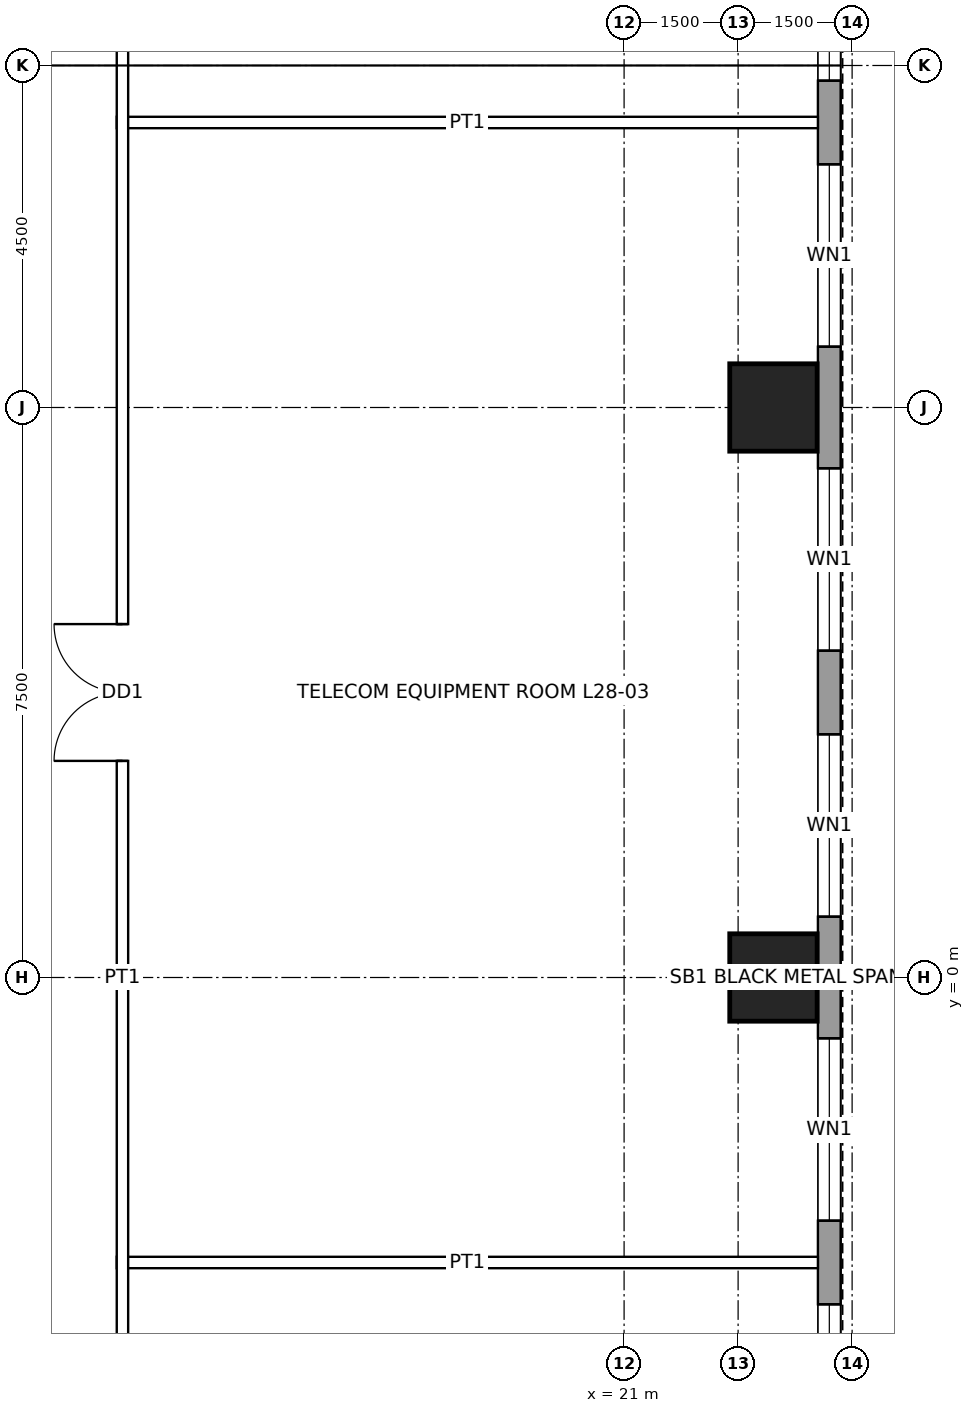
"""IFC4 building model, lengths in metres.
Left out: names, types, materials, properties, quantities, classifications, styles, units other than length and angle.
Written with IfcOpenShell. Run it as: python <this file> out.ifc"""

import sys

from ifc_helpers import new_model, si_unit, direction, frame, frame_2d, origin, origin_2d, place, context, subcontext, project, spatial, rectangle, hollow_rectangle, extrude, element, fill, save


model = new_model("IFC4")
c1 = context("Model", 3, precision=1e-05, world=origin(), true_north=direction((0.0, 1.0)))
c2 = subcontext(c1, "Body", "Model", "MODEL_VIEW")
j1 = project(units=[si_unit("LENGTHUNIT", "METRE"), si_unit("PLANEANGLEUNIT", "RADIAN")], contexts=[c1])
p1 = place(None, origin())
s1 = spatial("IfcSite", under=j1, at=p1, CompositionType="ELEMENT")
p2 = place(p1, origin())
s2 = spatial("IfcBuilding", under=s1, at=p2, CompositionType="ELEMENT")
p3 = place(p2, frame((0.0, 0.0, 140.4)))
s3 = spatial("IfcBuildingStorey", under=s2, at=p3, CompositionType="ELEMENT", Elevation=140.4)
for number, where, z_axis, x_axis in (
    (1, (22.965, 7.5, 0.0), (0.0, 0.0, 1.0), (1.0, 0.0, 0.0)),
    (2, (22.965, 0.0, 0.0), (0.0, 0.0, 1.0), (1.0, 0.0, 0.0)),
):
    element("IfcColumn", number, at=place(p3, frame(where, z_axis=z_axis, x_axis=x_axis)), inside=s3, PredefinedType="COLUMN", context=c2, shape_type="SweptSolid", body=[
        extrude(hollow_rectangle(XDim=1.15, YDim=1.15, WallThickness=0.075, at=origin_2d()), origin(), (0.0, 0.0, 1.0), 4.5),
    ])
p4 = place(p3, frame((23.7, 16.2, 0.0), z_axis=(0.0, 0.0, 1.0), x_axis=(0.0, -1.0, 0.0)))
e3 = element("IfcWall", 3, at=p4, inside=s3, PredefinedType="SOLIDWALL", context=c2, shape_type="SweptSolid", body=[
    extrude(rectangle(XDim=32.4, YDim=0.3, at=frame_2d((16.2, 0.0))), origin(), (0.0, 0.0, 1.0), 4.3),
])
p5 = place(p4, frame((2.0, 0.0, 1.0)))
e4 = element("IfcOpeningElement", 4, at=p5, cuts=e3, PredefinedType="OPENING", context=c2, shape_type="SweptSolid", body=[
    extrude(rectangle(XDim=2.4, YDim=1.2, at=frame_2d((1.2, 0.6))), frame((0.0, 0.16, 0.0), z_axis=(0.0, -1.0, 0.0), x_axis=(1.0, 0.0, 0.0)), (0.0, 0.0, 1.0), 0.32),
])
p6 = place(p4, frame((5.5, 0.0, 1.0)))
e5 = element("IfcOpeningElement", 5, at=p6, cuts=e3, PredefinedType="OPENING", context=c2, shape_type="SweptSolid", body=[
    extrude(rectangle(XDim=2.4, YDim=1.2, at=frame_2d((1.2, 0.6))), frame((0.0, 0.16, 0.0), z_axis=(0.0, -1.0, 0.0), x_axis=(1.0, 0.0, 0.0)), (0.0, 0.0, 1.0), 0.32),
])
p7 = place(p4, frame((9.5, 0.0, 1.0)))
e6 = element("IfcOpeningElement", 6, at=p7, cuts=e3, PredefinedType="OPENING", context=c2, shape_type="SweptSolid", body=[
    extrude(rectangle(XDim=2.4, YDim=1.2, at=frame_2d((1.2, 0.6))), frame((0.0, 0.16, 0.0), z_axis=(0.0, -1.0, 0.0), x_axis=(1.0, 0.0, 0.0)), (0.0, 0.0, 1.0), 0.32),
])
p8 = place(p4, frame((13.0, 0.0, 1.0)))
e7 = element("IfcOpeningElement", 7, at=p8, cuts=e3, PredefinedType="OPENING", context=c2, shape_type="SweptSolid", body=[
    extrude(rectangle(XDim=2.4, YDim=1.2, at=frame_2d((1.2, 0.6))), frame((0.0, 0.16, 0.0), z_axis=(0.0, -1.0, 0.0), x_axis=(1.0, 0.0, 0.0)), (0.0, 0.0, 1.0), 0.32),
])
p9 = place(p4, frame((17.0, 0.0, 1.0)))
e8 = element("IfcOpeningElement", 8, at=p9, cuts=e3, PredefinedType="OPENING", context=c2, shape_type="SweptSolid", body=[
    extrude(rectangle(XDim=2.4, YDim=1.2, at=frame_2d((1.2, 0.6))), frame((0.0, 0.16, 0.0), z_axis=(0.0, -1.0, 0.0), x_axis=(1.0, 0.0, 0.0)), (0.0, 0.0, 1.0), 0.32),
])
p10 = place(p4, frame((20.5, 0.0, 1.0)))
e9 = element("IfcOpeningElement", 9, at=p10, cuts=e3, PredefinedType="OPENING", context=c2, shape_type="SweptSolid", body=[
    extrude(rectangle(XDim=2.4, YDim=1.2, at=frame_2d((1.2, 0.6))), frame((0.0, 0.16, 0.0), z_axis=(0.0, -1.0, 0.0), x_axis=(1.0, 0.0, 0.0)), (0.0, 0.0, 1.0), 0.32),
])
p11 = place(p4, frame((24.5, 0.0, 1.0)))
e10 = element("IfcOpeningElement", 10, at=p11, cuts=e3, PredefinedType="OPENING", context=c2, shape_type="SweptSolid", body=[
    extrude(rectangle(XDim=2.4, YDim=1.2, at=frame_2d((1.2, 0.6))), frame((0.0, 0.16, 0.0), z_axis=(0.0, -1.0, 0.0), x_axis=(1.0, 0.0, 0.0)), (0.0, 0.0, 1.0), 0.32),
])
p12 = place(p4, frame((28.0, 0.0, 1.0)))
e11 = element("IfcOpeningElement", 11, at=p12, cuts=e3, PredefinedType="OPENING", context=c2, shape_type="SweptSolid", body=[
    extrude(rectangle(XDim=2.4, YDim=1.2, at=frame_2d((1.2, 0.6))), frame((0.0, 0.16, 0.0), z_axis=(0.0, -1.0, 0.0), x_axis=(1.0, 0.0, 0.0)), (0.0, 0.0, 1.0), 0.32),
])
for number, where, z_axis, x_axis in (
    (12, (14.325, -3.75, 0.0), (0.0, 0.0, 1.0), (1.0, 0.0, 0.0)),
    (13, (14.325, 11.25, 0.0), (0.0, 0.0, 1.0), (1.0, 0.0, 0.0)),
):
    element("IfcWall", number, at=place(p3, frame(where, z_axis=z_axis, x_axis=x_axis)), inside=s3, PredefinedType="PARTITIONING", context=c2, shape_type="SweptSolid", body=[
        extrude(rectangle(XDim=9.225, YDim=0.15, at=frame_2d((4.613, 0.0))), origin(), (0.0, 0.0, 1.0), 3.431),
    ])
p13 = place(p3, frame((14.4, -14.475, 0.0), z_axis=(0.0, 0.0, 1.0), x_axis=(0.0, 1.0, 0.0)))
e14 = element("IfcWall", 14, at=p13, inside=s3, PredefinedType="PARTITIONING", context=c2, shape_type="SweptSolid", body=[
    extrude(rectangle(XDim=28.95, YDim=0.15, at=frame_2d((14.475, 0.0))), origin(), (0.0, 0.0, 1.0), 4.3),
])
p14 = place(p13, frame((17.325, 0.0, 0.0)))
e15 = element("IfcOpeningElement", 15, at=p14, cuts=e14, PredefinedType="OPENING", context=c2, shape_type="SweptSolid", body=[
    extrude(rectangle(XDim=1.8, YDim=2.4, at=frame_2d((0.9, 1.2))), frame((0.0, 0.085, 0.0), z_axis=(0.0, -1.0, 0.0), x_axis=(1.0, 0.0, 0.0)), (0.0, 0.0, 1.0), 0.17),
])
p15 = place(p13, frame((6.075, 0.0, 0.0)))
e16 = element("IfcOpeningElement", 16, at=p15, cuts=e14, PredefinedType="OPENING", context=c2, shape_type="SweptSolid", body=[
    extrude(rectangle(XDim=1.8, YDim=2.4, at=frame_2d((0.9, 1.2))), frame((0.0, 0.085, 0.0), z_axis=(0.0, -1.0, 0.0), x_axis=(1.0, 0.0, 0.0)), (0.0, 0.0, 1.0), 0.17),
])
p16 = place(p5, origin())
e17 = element("IfcWindow", 17, at=p16, inside=s3, PartitioningType="SINGLE_PANEL", PredefinedType="WINDOW", context=c2, shape_type="SweptSolid", body=[
    extrude(rectangle(XDim=2.4, YDim=1.2, at=frame_2d((1.2, 0.6))), frame((0.0, 0.03, 0.0), z_axis=(0.0, -1.0, 0.0), x_axis=(1.0, 0.0, 0.0)), (0.0, 0.0, 1.0), 0.06),
])
fill(e4, e17)
p17 = place(p6, origin())
e18 = element("IfcWindow", 18, at=p17, inside=s3, PartitioningType="SINGLE_PANEL", PredefinedType="WINDOW", context=c2, shape_type="SweptSolid", body=[
    extrude(rectangle(XDim=2.4, YDim=1.2, at=frame_2d((1.2, 0.6))), frame((0.0, 0.03, 0.0), z_axis=(0.0, -1.0, 0.0), x_axis=(1.0, 0.0, 0.0)), (0.0, 0.0, 1.0), 0.06),
])
fill(e5, e18)
p18 = place(p7, origin())
e19 = element("IfcWindow", 19, at=p18, inside=s3, PartitioningType="SINGLE_PANEL", PredefinedType="WINDOW", context=c2, shape_type="SweptSolid", body=[
    extrude(rectangle(XDim=2.4, YDim=1.2, at=frame_2d((1.2, 0.6))), frame((0.0, 0.03, 0.0), z_axis=(0.0, -1.0, 0.0), x_axis=(1.0, 0.0, 0.0)), (0.0, 0.0, 1.0), 0.06),
])
fill(e6, e19)
p19 = place(p8, origin())
e20 = element("IfcWindow", 20, at=p19, inside=s3, PartitioningType="SINGLE_PANEL", PredefinedType="WINDOW", context=c2, shape_type="SweptSolid", body=[
    extrude(rectangle(XDim=2.4, YDim=1.2, at=frame_2d((1.2, 0.6))), frame((0.0, 0.03, 0.0), z_axis=(0.0, -1.0, 0.0), x_axis=(1.0, 0.0, 0.0)), (0.0, 0.0, 1.0), 0.06),
])
fill(e7, e20)
p20 = place(p9, origin())
e21 = element("IfcWindow", 21, at=p20, inside=s3, PartitioningType="SINGLE_PANEL", PredefinedType="WINDOW", context=c2, shape_type="SweptSolid", body=[
    extrude(rectangle(XDim=2.4, YDim=1.2, at=frame_2d((1.2, 0.6))), frame((0.0, 0.03, 0.0), z_axis=(0.0, -1.0, 0.0), x_axis=(1.0, 0.0, 0.0)), (0.0, 0.0, 1.0), 0.06),
])
fill(e8, e21)
p21 = place(p10, origin())
e22 = element("IfcWindow", 22, at=p21, inside=s3, PartitioningType="SINGLE_PANEL", PredefinedType="WINDOW", context=c2, shape_type="SweptSolid", body=[
    extrude(rectangle(XDim=2.4, YDim=1.2, at=frame_2d((1.2, 0.6))), frame((0.0, 0.03, 0.0), z_axis=(0.0, -1.0, 0.0), x_axis=(1.0, 0.0, 0.0)), (0.0, 0.0, 1.0), 0.06),
])
fill(e9, e22)
p22 = place(p14, origin())
e23 = element("IfcDoor", 23, at=p22, inside=s3, OperationType="DOUBLE_DOOR_SINGLE_SWING", PredefinedType="DOOR", context=c2, shape_type="SweptSolid", body=[
    extrude(rectangle(XDim=1.8, YDim=2.4, at=frame_2d((0.9, 1.2))), frame((0.0, 0.025, 0.0), z_axis=(0.0, -1.0, 0.0), x_axis=(1.0, 0.0, 0.0)), (0.0, 0.0, 1.0), 0.05),
])
fill(e15, e23)
save(model, sys.argv[1])
